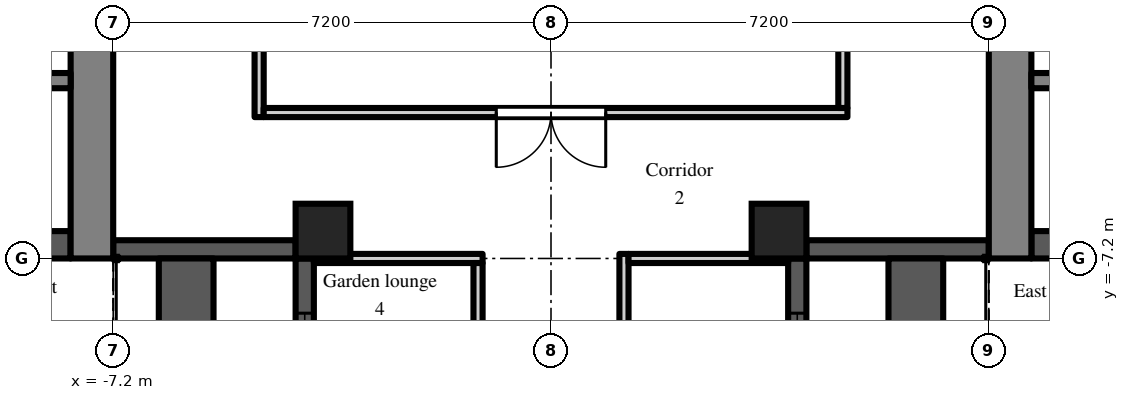
"""IFC4 building model, lengths in metres.
Left out: names, types, materials, properties, quantities, classifications, styles, units other than length and angle.
Written with IfcOpenShell. Run it as: python <this file> out.ifc"""

import sys

from ifc_helpers import new_model, si_unit, direction, frame, frame_2d, origin, origin_2d, place, context, subcontext, project, spatial, rectangle, extrude, element, fill, save


model = new_model("IFC4")
c1 = context("Model", 3, precision=1e-05, world=origin(), true_north=direction((0.0, 1.0)))
c2 = subcontext(c1, "Body", "Model", "MODEL_VIEW")
j1 = project(units=[si_unit("LENGTHUNIT", "METRE"), si_unit("PLANEANGLEUNIT", "RADIAN")], contexts=[c1])
p1 = place(None, origin())
s1 = spatial("IfcSite", under=j1, at=p1, CompositionType="ELEMENT")
p2 = place(p1, origin())
s2 = spatial("IfcBuilding", under=s1, at=p2, CompositionType="ELEMENT")
p3 = place(p2, frame((0.0, 0.0, 138.3)))
s3 = spatial("IfcBuildingStorey", under=s2, at=p3, CompositionType="ELEMENT", Elevation=138.3)
for number, where, z_axis, x_axis in (
    (1, (-3.75, -6.75, 0.0), (0.0, 0.0, 1.0), (1.0, 0.0, 0.0)),
    (2, (3.75, -6.75, 0.0), (0.0, 0.0, 1.0), (1.0, 0.0, 0.0)),
):
    element("IfcColumn", number, at=place(p3, frame(where, z_axis=z_axis, x_axis=x_axis)), inside=s3, PredefinedType="COLUMN", context=c2, shape_type="SweptSolid", body=[
        extrude(rectangle(XDim=0.9, YDim=0.9, at=origin_2d()), origin(), (0.0, 0.0, 1.0), 3.0),
    ])
p4 = place(p3, frame((-7.2, -7.05, 0.0), z_axis=(0.0, 0.0, 1.0), x_axis=(1.0, 0.0, 0.0)))
e3 = element("IfcWall", 3, at=p4, inside=s3, PredefinedType="SOLIDWALL", context=c2, shape_type="SweptSolid", body=[
    extrude(rectangle(XDim=3.0, YDim=0.3, at=frame_2d((1.5, 0.0))), origin(), (0.0, 0.0, 1.0), 2.2),
])
p5 = place(p3, frame((-4.05, -7.2, 0.0), z_axis=(0.0, 0.0, 1.0), x_axis=(0.0, -1.0, 0.0)))
e4 = element("IfcWall", 4, at=p5, inside=s3, PredefinedType="SOLIDWALL", context=c2, shape_type="SweptSolid", body=[
    extrude(rectangle(XDim=7.2, YDim=0.3, at=frame_2d((3.6, 0.0))), origin(), (0.0, 0.0, 1.0), 2.2),
])
p6 = place(p5, frame((3.0, 0.0, 0.0)))
e5 = element("IfcOpeningElement", 5, at=p6, cuts=e4, PredefinedType="OPENING", context=c2, shape_type="SweptSolid", body=[
    extrude(rectangle(XDim=1.2, YDim=2.05, at=frame_2d((0.6, 1.025))), frame((0.0, 0.16, 0.0), z_axis=(0.0, -1.0, 0.0), x_axis=(1.0, 0.0, 0.0)), (0.0, 0.0, 1.0), 0.32),
])
p7 = place(p5, frame((0.9, 0.0, 0.2)))
e6 = element("IfcOpeningElement", 6, at=p7, cuts=e4, PredefinedType="OPENING", context=c2, shape_type="SweptSolid", body=[
    extrude(rectangle(XDim=1.8, YDim=1.85, at=frame_2d((0.9, 0.925))), frame((0.0, 0.16, 0.0), z_axis=(0.0, -1.0, 0.0), x_axis=(1.0, 0.0, 0.0)), (0.0, 0.0, 1.0), 0.32),
])
p8 = place(p5, frame((4.5, 0.0, 0.2)))
e7 = element("IfcOpeningElement", 7, at=p8, cuts=e4, PredefinedType="OPENING", context=c2, shape_type="SweptSolid", body=[
    extrude(rectangle(XDim=1.8, YDim=1.85, at=frame_2d((0.9, 0.925))), frame((0.0, 0.16, 0.0), z_axis=(0.0, -1.0, 0.0), x_axis=(1.0, 0.0, 0.0)), (0.0, 0.0, 1.0), 0.32),
])
p9 = place(p3, frame((4.05, -14.4, 0.0), z_axis=(0.0, 0.0, 1.0), x_axis=(0.0, 1.0, 0.0)))
e8 = element("IfcWall", 8, at=p9, inside=s3, PredefinedType="SOLIDWALL", context=c2, shape_type="SweptSolid", body=[
    extrude(rectangle(XDim=7.2, YDim=0.3, at=frame_2d((3.6, 0.0))), origin(), (0.0, 0.0, 1.0), 2.2),
])
p10 = place(p9, frame((3.0, 0.0, 0.0)))
e9 = element("IfcOpeningElement", 9, at=p10, cuts=e8, PredefinedType="OPENING", context=c2, shape_type="SweptSolid", body=[
    extrude(rectangle(XDim=1.2, YDim=2.05, at=frame_2d((0.6, 1.025))), frame((0.0, 0.16, 0.0), z_axis=(0.0, -1.0, 0.0), x_axis=(1.0, 0.0, 0.0)), (0.0, 0.0, 1.0), 0.32),
])
p11 = place(p9, frame((0.9, 0.0, 0.2)))
e10 = element("IfcOpeningElement", 10, at=p11, cuts=e8, PredefinedType="OPENING", context=c2, shape_type="SweptSolid", body=[
    extrude(rectangle(XDim=1.8, YDim=1.85, at=frame_2d((0.9, 0.925))), frame((0.0, 0.16, 0.0), z_axis=(0.0, -1.0, 0.0), x_axis=(1.0, 0.0, 0.0)), (0.0, 0.0, 1.0), 0.32),
])
p12 = place(p9, frame((4.5, 0.0, 0.2)))
e11 = element("IfcOpeningElement", 11, at=p12, cuts=e8, PredefinedType="OPENING", context=c2, shape_type="SweptSolid", body=[
    extrude(rectangle(XDim=1.8, YDim=1.85, at=frame_2d((0.9, 0.925))), frame((0.0, 0.16, 0.0), z_axis=(0.0, -1.0, 0.0), x_axis=(1.0, 0.0, 0.0)), (0.0, 0.0, 1.0), 0.32),
])
p13 = place(p3, frame((4.2, -7.05, 0.0), z_axis=(0.0, 0.0, 1.0), x_axis=(1.0, 0.0, 0.0)))
e12 = element("IfcWall", 12, at=p13, inside=s3, PredefinedType="SOLIDWALL", context=c2, shape_type="SweptSolid", body=[
    extrude(rectangle(XDim=3.0, YDim=0.3, at=frame_2d((1.5, 0.0))), origin(), (0.0, 0.0, 1.0), 2.2),
])
for number, where, z_axis, x_axis in (
    (13, (6.0, -14.4, 0.0), (0.0, 0.0, 1.0), (0.0, 1.0, 0.0)),
    (14, (-6.0, -14.4, 0.0), (0.0, 0.0, 1.0), (0.0, 1.0, 0.0)),
):
    element("IfcWall", number, at=place(p3, frame(where, z_axis=z_axis, x_axis=x_axis)), inside=s3, PredefinedType="PARAPET", context=c2, shape_type="SweptSolid", body=[
        extrude(rectangle(XDim=7.2, YDim=0.9, at=frame_2d((3.6, 0.0))), origin(), (0.0, 0.0, 1.0), 0.8),
    ])
p14 = place(p3, frame((7.55, -7.2, 0.0), z_axis=(0.0, 0.0, 1.0), x_axis=(0.0, 1.0, 0.0)))
e15 = element("IfcWall", 15, at=p14, inside=s3, PredefinedType="SHEAR", context=c2, shape_type="SweptSolid", body=[
    extrude(rectangle(XDim=14.4, YDim=0.7, at=frame_2d((7.2, 0.0))), origin(), (0.0, 0.0, 1.0), 2.6),
])
p15 = place(p14, frame((6.0, 0.0, 0.0)))
e16 = element("IfcOpeningElement", 16, at=p15, cuts=e15, PredefinedType="OPENING", context=c2, shape_type="SweptSolid", body=[
    extrude(rectangle(XDim=2.4, YDim=2.2, at=frame_2d((1.2, 1.1))), frame((0.0, 0.36, 0.0), z_axis=(0.0, -1.0, 0.0), x_axis=(1.0, 0.0, 0.0)), (0.0, 0.0, 1.0), 0.72),
])
p16 = place(p3, frame((7.9, -6.975, 0.0), z_axis=(0.0, 0.0, 1.0), x_axis=(1.0, 0.0, 0.0)))
e17 = element("IfcWall", 17, at=p16, inside=s3, PredefinedType="SHEAR", context=c2, shape_type="SweptSolid", body=[
    extrude(rectangle(XDim=12.95, YDim=0.45, at=frame_2d((6.475, 0.0))), origin(), (0.0, 0.0, 1.0), 2.6),
])
p17 = place(p3, frame((7.9, -4.275, 0.0), z_axis=(0.0, 0.0, 1.0), x_axis=(1.0, 0.0, 0.0)))
e18 = element("IfcWall", 18, at=p17, inside=s3, PredefinedType="SHEAR", context=c2, shape_type="SweptSolid", body=[
    extrude(rectangle(XDim=1.95, YDim=0.25, at=frame_2d((0.975, 0.0))), origin(), (0.0, 0.0, 1.0), 2.6),
])
p18 = place(p3, frame((-7.55, -7.2, 0.0), z_axis=(0.0, 0.0, 1.0), x_axis=(0.0, 1.0, 0.0)))
e19 = element("IfcWall", 19, at=p18, inside=s3, PredefinedType="SHEAR", context=c2, shape_type="SweptSolid", body=[
    extrude(rectangle(XDim=14.4, YDim=0.7, at=frame_2d((7.2, 0.0))), origin(), (0.0, 0.0, 1.0), 2.6),
])
p19 = place(p18, frame((6.0, 0.0, 0.0)))
e20 = element("IfcOpeningElement", 20, at=p19, cuts=e19, PredefinedType="OPENING", context=c2, shape_type="SweptSolid", body=[
    extrude(rectangle(XDim=2.4, YDim=2.2, at=frame_2d((1.2, 1.1))), frame((0.0, 0.36, 0.0), z_axis=(0.0, -1.0, 0.0), x_axis=(1.0, 0.0, 0.0)), (0.0, 0.0, 1.0), 0.72),
])
p20 = place(p3, frame((-7.9, -6.975, 0.0), z_axis=(0.0, 0.0, 1.0), x_axis=(-1.0, 0.0, 0.0)))
e21 = element("IfcWall", 21, at=p20, inside=s3, PredefinedType="SHEAR", context=c2, shape_type="SweptSolid", body=[
    extrude(rectangle(XDim=12.95, YDim=0.45, at=frame_2d((6.475, 0.0))), origin(), (0.0, 0.0, 1.0), 2.6),
])
p21 = place(p3, frame((-7.9, -4.275, 0.0), z_axis=(0.0, 0.0, 1.0), x_axis=(-1.0, 0.0, 0.0)))
e22 = element("IfcWall", 22, at=p21, inside=s3, PredefinedType="SHEAR", context=c2, shape_type="SweptSolid", body=[
    extrude(rectangle(XDim=1.95, YDim=0.25, at=frame_2d((0.975, 0.0))), origin(), (0.0, 0.0, 1.0), 2.6),
])
p22 = place(p3, frame((-4.8, -4.875, 0.0), z_axis=(0.0, 0.0, 1.0), x_axis=(0.0, 1.0, 0.0)))
e23 = element("IfcWall", 23, at=p22, inside=s3, PredefinedType="PARTITIONING", context=c2, shape_type="SweptSolid", body=[
    extrude(rectangle(XDim=9.75, YDim=0.15, at=frame_2d((4.875, 0.0))), origin(), (0.0, 0.0, 1.0), 2.6),
])
p23 = place(p3, frame((-4.725, -4.8, 0.0), z_axis=(0.0, 0.0, 1.0), x_axis=(1.0, 0.0, 0.0)))
e24 = element("IfcWall", 24, at=p23, inside=s3, PredefinedType="PARTITIONING", context=c2, shape_type="SweptSolid", body=[
    extrude(rectangle(XDim=9.6, YDim=0.15, at=frame_2d((4.8, 0.0))), origin(), (0.0, 0.0, 1.0), 2.6),
])
p24 = place(p23, frame((3.825, 0.0, 0.0)))
e25 = element("IfcOpeningElement", 25, at=p24, cuts=e24, PredefinedType="OPENING", context=c2, shape_type="SweptSolid", body=[
    extrude(rectangle(XDim=1.8, YDim=2.1, at=frame_2d((0.9, 1.05))), frame((0.0, 0.085, 0.0), z_axis=(0.0, -1.0, 0.0), x_axis=(1.0, 0.0, 0.0)), (0.0, 0.0, 1.0), 0.17),
])
p25 = place(p3, frame((-3.9, -7.2, 0.0), z_axis=(0.0, 0.0, 1.0), x_axis=(1.0, 0.0, 0.0)))
e26 = element("IfcWall", 26, at=p25, inside=s3, PredefinedType="PARTITIONING", context=c2, shape_type="SweptSolid", body=[
    extrude(rectangle(XDim=2.775, YDim=0.15, at=frame_2d((1.387, 0.0))), origin(), (0.0, 0.0, 1.0), 2.6),
])
p26 = place(p3, frame((-1.2, -21.3, 0.0), z_axis=(0.0, 0.0, 1.0), x_axis=(0.0, 1.0, 0.0)))
e27 = element("IfcWall", 27, at=p26, inside=s3, PredefinedType="PARTITIONING", context=c2, shape_type="SweptSolid", body=[
    extrude(rectangle(XDim=14.025, YDim=0.15, at=frame_2d((7.013, 0.0))), origin(), (0.0, 0.0, 1.0), 2.6),
])
p27 = place(p26, frame((11.85, 0.0, 0.0)))
e28 = element("IfcOpeningElement", 28, at=p27, cuts=e27, PredefinedType="OPENING", context=c2, shape_type="SweptSolid", body=[
    extrude(rectangle(XDim=0.9, YDim=2.1, at=frame_2d((0.45, 1.05))), frame((0.0, 0.085, 0.0), z_axis=(0.0, -1.0, 0.0), x_axis=(1.0, 0.0, 0.0)), (0.0, 0.0, 1.0), 0.17),
])
p28 = place(p26, frame((4.65, 0.0, 0.0)))
e29 = element("IfcOpeningElement", 29, at=p28, cuts=e27, PredefinedType="OPENING", context=c2, shape_type="SweptSolid", body=[
    extrude(rectangle(XDim=0.9, YDim=2.1, at=frame_2d((0.45, 1.05))), frame((0.0, 0.085, 0.0), z_axis=(0.0, -1.0, 0.0), x_axis=(1.0, 0.0, 0.0)), (0.0, 0.0, 1.0), 0.17),
])
p29 = place(p26, frame((1.2, 0.0, 0.0)))
e30 = element("IfcOpeningElement", 30, at=p29, cuts=e27, PredefinedType="OPENING", context=c2, shape_type="SweptSolid", body=[
    extrude(rectangle(XDim=0.9, YDim=2.1, at=frame_2d((0.45, 1.05))), frame((0.0, 0.085, 0.0), z_axis=(0.0, -1.0, 0.0), x_axis=(1.0, 0.0, 0.0)), (0.0, 0.0, 1.0), 0.17),
])
p30 = place(p3, frame((1.2, -21.3, 0.0), z_axis=(0.0, 0.0, 1.0), x_axis=(0.0, 1.0, 0.0)))
e31 = element("IfcWall", 31, at=p30, inside=s3, PredefinedType="PARTITIONING", context=c2, shape_type="SweptSolid", body=[
    extrude(rectangle(XDim=14.175, YDim=0.15, at=frame_2d((7.087, 0.0))), origin(), (0.0, 0.0, 1.0), 2.6),
])
p31 = place(p30, frame((8.25, 0.0, 0.0)))
e32 = element("IfcOpeningElement", 32, at=p31, cuts=e31, PredefinedType="OPENING", context=c2, shape_type="SweptSolid", body=[
    extrude(rectangle(XDim=0.9, YDim=2.1, at=frame_2d((0.45, 1.05))), frame((0.0, 0.085, 0.0), z_axis=(0.0, -1.0, 0.0), x_axis=(1.0, 0.0, 0.0)), (0.0, 0.0, 1.0), 0.17),
])
p32 = place(p30, frame((2.55, 0.0, 0.0)))
e33 = element("IfcOpeningElement", 33, at=p32, cuts=e31, PredefinedType="OPENING", context=c2, shape_type="SweptSolid", body=[
    extrude(rectangle(XDim=1.8, YDim=2.1, at=frame_2d((0.9, 1.05))), frame((0.0, 0.085, 0.0), z_axis=(0.0, -1.0, 0.0), x_axis=(1.0, 0.0, 0.0)), (0.0, 0.0, 1.0), 0.17),
])
p33 = place(p3, frame((1.275, -7.2, 0.0), z_axis=(0.0, 0.0, 1.0), x_axis=(1.0, 0.0, 0.0)))
e34 = element("IfcWall", 34, at=p33, inside=s3, PredefinedType="PARTITIONING", context=c2, shape_type="SweptSolid", body=[
    extrude(rectangle(XDim=2.625, YDim=0.15, at=frame_2d((1.312, 0.0))), origin(), (0.0, 0.0, 1.0), 2.6),
])
p34 = place(p3, frame((4.8, -4.725, 0.0), z_axis=(0.0, 0.0, 1.0), x_axis=(0.0, 1.0, 0.0)))
e35 = element("IfcWall", 35, at=p34, inside=s3, PredefinedType="PARTITIONING", context=c2, shape_type="SweptSolid", body=[
    extrude(rectangle(XDim=9.45, YDim=0.15, at=frame_2d((4.725, 0.0))), origin(), (0.0, 0.0, 1.0), 2.6),
])
p35 = place(p7, origin())
e36 = element("IfcWindow", 36, at=p35, inside=s3, PartitioningType="SINGLE_PANEL", PredefinedType="WINDOW", context=c2, shape_type="SweptSolid", body=[
    extrude(rectangle(XDim=1.8, YDim=1.85, at=frame_2d((0.9, 0.925))), frame((0.0, 0.03, 0.0), z_axis=(0.0, -1.0, 0.0), x_axis=(1.0, 0.0, 0.0)), (0.0, 0.0, 1.0), 0.06),
])
fill(e6, e36)
p36 = place(p12, origin())
e37 = element("IfcWindow", 37, at=p36, inside=s3, PartitioningType="SINGLE_PANEL", PredefinedType="WINDOW", context=c2, shape_type="SweptSolid", body=[
    extrude(rectangle(XDim=1.8, YDim=1.85, at=frame_2d((0.9, 0.925))), frame((0.0, 0.03, 0.0), z_axis=(0.0, -1.0, 0.0), x_axis=(1.0, 0.0, 0.0)), (0.0, 0.0, 1.0), 0.06),
])
fill(e11, e37)
p37 = place(p24, frame((1.8, 0.0, 0.0), z_axis=(0.0, 0.0, 1.0), x_axis=(-1.0, 0.0, 0.0)))
e38 = element("IfcDoor", 38, at=p37, inside=s3, OperationType="DOUBLE_DOOR_DOUBLE_SWING", PredefinedType="DOOR", context=c2, shape_type="SweptSolid", body=[
    extrude(rectangle(XDim=1.8, YDim=2.1, at=frame_2d((0.9, 1.05))), frame((0.0, 0.025, 0.0), z_axis=(0.0, -1.0, 0.0), x_axis=(1.0, 0.0, 0.0)), (0.0, 0.0, 1.0), 0.05),
])
fill(e25, e38)
save(model, sys.argv[1])
